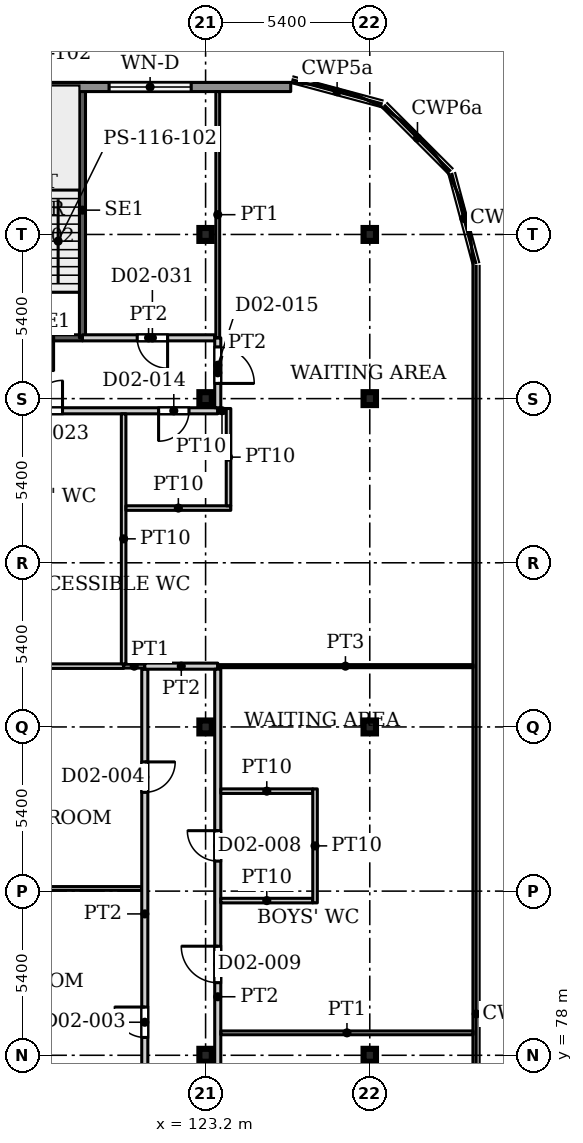
"""IFC4 building model, lengths in metres.
Left out: names, types, materials, properties, quantities, classifications, styles, units other than length and angle.
Written with IfcOpenShell. Run it as: python <this file> out.ifc"""

import sys

from ifc_helpers import new_model, si_unit, direction, frame, frame_2d, origin, origin_2d, place, context, subcontext, project, spatial, rectangle, i_section, extrude, source, transform, mapped, element, fill, save


model = new_model("IFC4")
c1 = context("Model", 3, precision=1e-05, world=origin(), true_north=direction((0.0, 1.0)))
c2 = subcontext(c1, "Body", "Model", "MODEL_VIEW")
j1 = project(units=[si_unit("LENGTHUNIT", "METRE"), si_unit("PLANEANGLEUNIT", "RADIAN")], contexts=[c1])
p1 = place(None, origin())
s1 = spatial("IfcSite", under=j1, at=p1, CompositionType="ELEMENT")
p2 = place(p1, origin())
s2 = spatial("IfcBuilding", under=s1, at=p2, CompositionType="ELEMENT")
p3 = place(p2, frame((0.0, 0.0, 12.5)))
s3 = spatial("IfcBuildingStorey", under=s2, at=p3, CompositionType="ELEMENT", Elevation=12.5)
for number, where, z_axis, x_axis in (
    (1, (123.2, 78.0, 0.0), (0.0, 0.0, 1.0), (1.0, 0.0, 0.0)),
    (2, (128.6, 78.0, 0.0), (0.0, 0.0, 1.0), (1.0, 0.0, 0.0)),
    (3, (123.2, 88.8, 0.0), (0.0, 0.0, 1.0), (1.0, 0.0, 0.0)),
    (4, (128.6, 88.8, 0.0), (0.0, 0.0, 1.0), (1.0, 0.0, 0.0)),
    (5, (123.2, 99.6, 0.0), (0.0, 0.0, 1.0), (1.0, 0.0, 0.0)),
    (6, (128.6, 99.6, 0.0), (0.0, 0.0, 1.0), (1.0, 0.0, 0.0)),
    (7, (123.2, 105.0, 0.0), (0.0, 0.0, 1.0), (1.0, 0.0, 0.0)),
    (8, (128.6, 105.0, 0.0), (0.0, 0.0, 1.0), (1.0, 0.0, 0.0)),
):
    element("IfcColumn", number, at=place(p3, frame(where, z_axis=z_axis, x_axis=x_axis)), inside=s3, PredefinedType="COLUMN", context=c2, shape_type="SweptSolid", body=[
        extrude(i_section(OverallWidth=0.409, OverallDepth=0.425, WebThickness=0.033, FlangeThickness=0.052, FilletRadius=0.013, at=origin_2d()), origin(), (0.0, 0.0, 1.0), 4.5),
    ])
p4 = place(p3, frame((78.48, 109.85, 0.0), z_axis=(0.0, 0.0, 1.0), x_axis=(1.0, 0.0, 0.0)))
e9 = element("IfcWall", 9, at=p4, inside=s3, PredefinedType="SOLIDWALL", context=c2, shape_type="SweptSolid", body=[
    extrude(rectangle(XDim=47.52, YDim=0.3, at=frame_2d((23.76, 0.0))), origin(), (0.0, 0.0, 1.0), 4.25),
])
p5 = place(p4, frame((1.045, 0.0, 0.9)))
e10 = element("IfcOpeningElement", 10, at=p5, cuts=e9, PredefinedType="OPENING", context=c2, shape_type="SweptSolid", body=[
    extrude(rectangle(XDim=2.7, YDim=2.1, at=frame_2d((1.35, 1.05))), frame((0.0, 0.16, 0.0), z_axis=(0.0, -1.0, 0.0), x_axis=(1.0, 0.0, 0.0)), (0.0, 0.0, 1.0), 0.32),
])
p6 = place(p4, frame((6.28, 0.0, 0.9)))
e11 = element("IfcOpeningElement", 11, at=p6, cuts=e9, PredefinedType="OPENING", context=c2, shape_type="SweptSolid", body=[
    extrude(rectangle(XDim=2.7, YDim=2.1, at=frame_2d((1.35, 1.05))), frame((0.0, 0.16, 0.0), z_axis=(0.0, -1.0, 0.0), x_axis=(1.0, 0.0, 0.0)), (0.0, 0.0, 1.0), 0.32),
])
p7 = place(p4, frame((15.765, 0.0, 0.9)))
e12 = element("IfcOpeningElement", 12, at=p7, cuts=e9, PredefinedType="OPENING", context=c2, shape_type="SweptSolid", body=[
    extrude(rectangle(XDim=2.7, YDim=2.1, at=frame_2d((1.35, 1.05))), frame((0.0, 0.16, 0.0), z_axis=(0.0, -1.0, 0.0), x_axis=(1.0, 0.0, 0.0)), (0.0, 0.0, 1.0), 0.32),
])
p8 = place(p4, frame((22.47, 0.0, 0.9)))
e13 = element("IfcOpeningElement", 13, at=p8, cuts=e9, PredefinedType="OPENING", context=c2, shape_type="SweptSolid", body=[
    extrude(rectangle(XDim=2.7, YDim=2.1, at=frame_2d((1.35, 1.05))), frame((0.0, 0.16, 0.0), z_axis=(0.0, -1.0, 0.0), x_axis=(1.0, 0.0, 0.0)), (0.0, 0.0, 1.0), 0.32),
])
p9 = place(p4, frame((30.99, 0.0, 0.9)))
e14 = element("IfcOpeningElement", 14, at=p9, cuts=e9, PredefinedType="OPENING", context=c2, shape_type="SweptSolid", body=[
    extrude(rectangle(XDim=2.7, YDim=2.1, at=frame_2d((1.35, 1.05))), frame((0.0, 0.16, 0.0), z_axis=(0.0, -1.0, 0.0), x_axis=(1.0, 0.0, 0.0)), (0.0, 0.0, 1.0), 0.32),
])
p10 = place(p4, frame((41.545, 0.0, 0.9)))
e15 = element("IfcOpeningElement", 15, at=p10, cuts=e9, PredefinedType="OPENING", context=c2, shape_type="SweptSolid", body=[
    extrude(rectangle(XDim=2.7, YDim=2.1, at=frame_2d((1.35, 1.05))), frame((0.0, 0.16, 0.0), z_axis=(0.0, -1.0, 0.0), x_axis=(1.0, 0.0, 0.0)), (0.0, 0.0, 1.0), 0.32),
])
p11 = place(p3, frame((116.0, 101.6, 0.0), z_axis=(0.0, 0.0, 1.0), x_axis=(1.0, 0.0, 0.0)))
e16 = element("IfcWall", 16, at=p11, inside=s3, PredefinedType="SHEAR", context=c2, shape_type="SweptSolid", body=[
    extrude(rectangle(XDim=3.15, YDim=0.2, at=frame_2d((1.575, 0.0))), origin(), (0.0, 0.0, 1.0), 4.5),
])
p12 = place(p11, frame((1.1, 0.0, 0.0)))
e17 = element("IfcOpeningElement", 17, at=p12, cuts=e16, PredefinedType="OPENING", context=c2, shape_type="SweptSolid", body=[
    extrude(rectangle(XDim=1.1, YDim=2.2, at=frame_2d((0.55, 1.1))), frame((0.0, 0.11, 0.0), z_axis=(0.0, -1.0, 0.0), x_axis=(1.0, 0.0, 0.0)), (0.0, 0.0, 1.0), 0.22),
])
p13 = place(p3, frame((119.15, 101.6, 0.0), z_axis=(0.0, 0.0, 1.0), x_axis=(0.0, 1.0, 0.0)))
e18 = element("IfcWall", 18, at=p13, inside=s3, PredefinedType="SHEAR", context=c2, shape_type="SweptSolid", body=[
    extrude(rectangle(XDim=8.4, YDim=0.2, at=frame_2d((4.2, 0.0))), origin(), (0.0, 0.0, 1.0), 4.5),
])
p14 = place(p3, frame((56.1, 99.2, 0.0), z_axis=(0.0, 0.0, 1.0), x_axis=(1.0, 0.0, 0.0)))
e19 = element("IfcWall", 19, at=p14, inside=s3, PredefinedType="PARTITIONING", context=c2, shape_type="SweptSolid", body=[
    extrude(rectangle(XDim=67.5, YDim=0.2, at=frame_2d((33.75, 0.0))), origin(), (0.0, 0.0, 1.0), 4.18),
])
p15 = place(p14, frame((4.05, 0.0, 0.0)))
e20 = element("IfcOpeningElement", 20, at=p15, cuts=e19, PredefinedType="OPENING", context=c2, shape_type="SweptSolid", body=[
    extrude(rectangle(XDim=1.0, YDim=2.1, at=frame_2d((0.5, 1.05))), frame((0.0, 0.11, 0.0), z_axis=(0.0, -1.0, 0.0), x_axis=(1.0, 0.0, 0.0)), (0.0, 0.0, 1.0), 0.22),
])
p16 = place(p14, frame((65.554, 0.0, 0.0)))
e21 = element("IfcOpeningElement", 21, at=p16, cuts=e19, PredefinedType="OPENING", context=c2, shape_type="SweptSolid", body=[
    extrude(rectangle(XDim=1.0, YDim=2.1, at=frame_2d((0.5, 1.05))), frame((0.0, 0.11, 0.0), z_axis=(0.0, -1.0, 0.0), x_axis=(1.0, 0.0, 0.0)), (0.0, 0.0, 1.0), 0.22),
])
p17 = place(p14, frame((11.589, 0.0, 0.0)))
e22 = element("IfcOpeningElement", 22, at=p17, cuts=e19, PredefinedType="OPENING", context=c2, shape_type="SweptSolid", body=[
    extrude(rectangle(XDim=1.0, YDim=2.1, at=frame_2d((0.5, 1.05))), frame((0.0, 0.11, 0.0), z_axis=(0.0, -1.0, 0.0), x_axis=(1.0, 0.0, 0.0)), (0.0, 0.0, 1.0), 0.22),
])
p18 = place(p14, frame((20.329, 0.0, 0.0)))
e23 = element("IfcOpeningElement", 23, at=p18, cuts=e19, PredefinedType="OPENING", context=c2, shape_type="SweptSolid", body=[
    extrude(rectangle(XDim=1.0, YDim=2.1, at=frame_2d((0.5, 1.05))), frame((0.0, 0.11, 0.0), z_axis=(0.0, -1.0, 0.0), x_axis=(1.0, 0.0, 0.0)), (0.0, 0.0, 1.0), 0.22),
])
p19 = place(p14, frame((27.319, 0.0, 0.0)))
e24 = element("IfcOpeningElement", 24, at=p19, cuts=e19, PredefinedType="OPENING", context=c2, shape_type="SweptSolid", body=[
    extrude(rectangle(XDim=1.0, YDim=2.1, at=frame_2d((0.5, 1.05))), frame((0.0, 0.11, 0.0), z_axis=(0.0, -1.0, 0.0), x_axis=(1.0, 0.0, 0.0)), (0.0, 0.0, 1.0), 0.22),
])
p20 = place(p14, frame((33.262, 0.0, 0.0)))
e25 = element("IfcOpeningElement", 25, at=p20, cuts=e19, PredefinedType="OPENING", context=c2, shape_type="SweptSolid", body=[
    extrude(rectangle(XDim=1.0, YDim=2.1, at=frame_2d((0.5, 1.05))), frame((0.0, 0.11, 0.0), z_axis=(0.0, -1.0, 0.0), x_axis=(1.0, 0.0, 0.0)), (0.0, 0.0, 1.0), 0.22),
])
p21 = place(p14, frame((42.002, 0.0, 0.0)))
e26 = element("IfcOpeningElement", 26, at=p21, cuts=e19, PredefinedType="OPENING", context=c2, shape_type="SweptSolid", body=[
    extrude(rectangle(XDim=1.0, YDim=2.1, at=frame_2d((0.5, 1.05))), frame((0.0, 0.11, 0.0), z_axis=(0.0, -1.0, 0.0), x_axis=(1.0, 0.0, 0.0)), (0.0, 0.0, 1.0), 0.22),
])
p22 = place(p14, frame((49.743, 0.0, 0.0)))
e27 = element("IfcOpeningElement", 27, at=p22, cuts=e19, PredefinedType="OPENING", context=c2, shape_type="SweptSolid", body=[
    extrude(rectangle(XDim=1.0, YDim=2.1, at=frame_2d((0.5, 1.05))), frame((0.0, 0.11, 0.0), z_axis=(0.0, -1.0, 0.0), x_axis=(1.0, 0.0, 0.0)), (0.0, 0.0, 1.0), 0.22),
])
p23 = place(p14, frame((56.733, 0.0, 0.0)))
e28 = element("IfcOpeningElement", 28, at=p23, cuts=e19, PredefinedType="OPENING", context=c2, shape_type="SweptSolid", body=[
    extrude(rectangle(XDim=1.0, YDim=2.1, at=frame_2d((0.5, 1.05))), frame((0.0, 0.11, 0.0), z_axis=(0.0, -1.0, 0.0), x_axis=(1.0, 0.0, 0.0)), (0.0, 0.0, 1.0), 0.22),
])
p24 = place(p14, frame((61.394, 0.0, 0.0)))
e29 = element("IfcOpeningElement", 29, at=p24, cuts=e19, PredefinedType="OPENING", context=c2, shape_type="SweptSolid", body=[
    extrude(rectangle(XDim=1.0, YDim=2.1, at=frame_2d((0.5, 1.05))), frame((0.0, 0.11, 0.0), z_axis=(0.0, -1.0, 0.0), x_axis=(1.0, 0.0, 0.0)), (0.0, 0.0, 1.0), 0.22),
])
p25 = place(p3, frame((110.183, 90.8, 0.0), z_axis=(0.0, 0.0, 1.0), x_axis=(1.0, 0.0, 0.0)))
e30 = element("IfcWall", 30, at=p25, inside=s3, PredefinedType="PARTITIONING", context=c2, shape_type="SweptSolid", body=[
    extrude(rectangle(XDim=10.321, YDim=0.15, at=frame_2d((5.16, 0.0))), origin(), (0.0, 0.0, 1.0), 4.18),
])
p26 = place(p3, frame((112.862, 83.487, 0.0), z_axis=(0.0, 0.0, 1.0), x_axis=(1.0, 0.0, 0.0)))
e31 = element("IfcWall", 31, at=p26, inside=s3, PredefinedType="PARTITIONING", context=c2, shape_type="SweptSolid", body=[
    extrude(rectangle(XDim=8.238, YDim=0.125, at=frame_2d((4.119, 0.0))), origin(), (0.0, 0.0, 1.0), 4.18),
])
p27 = place(p3, frame((119.15, 101.6, 0.0), z_axis=(0.0, 0.0, 1.0), x_axis=(1.0, 0.0, 0.0)))
e32 = element("IfcWall", 32, at=p27, inside=s3, PredefinedType="PARTITIONING", context=c2, shape_type="SweptSolid", body=[
    extrude(rectangle(XDim=4.35, YDim=0.2, at=frame_2d((2.175, 0.0))), origin(), (0.0, 0.0, 1.0), 4.18),
])
p28 = place(p27, frame((1.8, 0.0, 0.0)))
e33 = element("IfcOpeningElement", 33, at=p28, cuts=e32, PredefinedType="OPENING", context=c2, shape_type="SweptSolid", body=[
    extrude(rectangle(XDim=1.0, YDim=2.1, at=frame_2d((0.5, 1.05))), frame((0.0, 0.11, 0.0), z_axis=(0.0, -1.0, 0.0), x_axis=(1.0, 0.0, 0.0)), (0.0, 0.0, 1.0), 0.22),
])
p29 = place(p3, frame((120.504, 90.8, 0.0), z_axis=(0.0, 0.0, 1.0), x_axis=(1.0, 0.0, 0.0)))
e34 = element("IfcWall", 34, at=p29, inside=s3, PredefinedType="PARTITIONING", context=c2, shape_type="SweptSolid", body=[
    extrude(rectangle(XDim=0.696, YDim=0.125, at=frame_2d((0.348, 0.0))), origin(), (0.0, 0.0, 1.0), 4.18),
])
p30 = place(p3, frame((120.504, 90.875, 0.0), z_axis=(0.0, 0.0, 1.0), x_axis=(0.0, 1.0, 0.0)))
e35 = element("IfcWall", 35, at=p30, inside=s3, PredefinedType="PARTITIONING", context=c2, shape_type="SweptSolid", body=[
    extrude(rectangle(XDim=8.225, YDim=0.15, at=frame_2d((4.113, 0.0))), origin(), (0.0, 0.0, 1.0), 4.18),
])
p31 = place(p3, frame((120.579, 96.0, 0.0), z_axis=(0.0, 0.0, 1.0), x_axis=(1.0, 0.0, 0.0)))
e36 = element("IfcWall", 36, at=p31, inside=s3, PredefinedType="PARTITIONING", context=c2, shape_type="SweptSolid", body=[
    extrude(rectangle(XDim=3.45, YDim=0.15, at=frame_2d((1.725, 0.0))), origin(), (0.0, 0.0, 1.0), 4.18),
])
p32 = place(p3, frame((121.2, 74.6, 0.0), z_axis=(0.0, 0.0, 1.0), x_axis=(0.0, 1.0, 0.0)))
e37 = element("IfcWall", 37, at=p32, inside=s3, PredefinedType="PARTITIONING", context=c2, shape_type="SweptSolid", body=[
    extrude(rectangle(XDim=16.1, YDim=0.2, at=frame_2d((8.05, 0.0))), origin(), (0.0, 0.0, 1.0), 4.18),
])
p33 = place(p32, frame((3.987, 0.0, 0.0)))
e38 = element("IfcOpeningElement", 38, at=p33, cuts=e37, PredefinedType="OPENING", context=c2, shape_type="SweptSolid", body=[
    extrude(rectangle(XDim=1.0, YDim=2.1, at=frame_2d((0.5, 1.05))), frame((0.0, 0.11, 0.0), z_axis=(0.0, -1.0, 0.0), x_axis=(1.0, 0.0, 0.0)), (0.0, 0.0, 1.0), 0.22),
])
p34 = place(p32, frame((12.05, 0.0, 0.0)))
e39 = element("IfcOpeningElement", 39, at=p34, cuts=e37, PredefinedType="OPENING", context=c2, shape_type="SweptSolid", body=[
    extrude(rectangle(XDim=1.0, YDim=2.1, at=frame_2d((0.5, 1.05))), frame((0.0, 0.11, 0.0), z_axis=(0.0, -1.0, 0.0), x_axis=(1.0, 0.0, 0.0)), (0.0, 0.0, 1.0), 0.22),
])
p35 = place(p3, frame((121.2, 90.8, 0.0), z_axis=(0.0, 0.0, 1.0), x_axis=(1.0, 0.0, 0.0)))
e40 = element("IfcWall", 40, at=p35, inside=s3, PredefinedType="PARTITIONING", context=c2, shape_type="SweptSolid", body=[
    extrude(rectangle(XDim=2.4, YDim=0.2, at=frame_2d((1.2, 0.0))), origin(), (0.0, 0.0, 1.0), 4.18),
])
p36 = place(p3, frame((123.6, 69.15, 0.0), z_axis=(0.0, 0.0, 1.0), x_axis=(0.0, 1.0, 0.0)))
e41 = element("IfcWall", 41, at=p36, inside=s3, PredefinedType="PARTITIONING", context=c2, shape_type="SweptSolid", body=[
    extrude(rectangle(XDim=21.55, YDim=0.2, at=frame_2d((10.775, 0.0))), origin(), (0.0, 0.0, 1.0), 4.18),
])
p37 = place(p36, frame((4.4, 0.0, 0.0)))
e42 = element("IfcOpeningElement", 42, at=p37, cuts=e41, PredefinedType="OPENING", context=c2, shape_type="SweptSolid", body=[
    extrude(rectangle(XDim=1.0, YDim=2.1, at=frame_2d((0.5, 1.05))), frame((0.0, 0.11, 0.0), z_axis=(0.0, -1.0, 0.0), x_axis=(1.0, 0.0, 0.0)), (0.0, 0.0, 1.0), 0.22),
])
p38 = place(p36, frame((15.238, 0.0, 0.0)))
e43 = element("IfcOpeningElement", 43, at=p38, cuts=e41, PredefinedType="OPENING", context=c2, shape_type="SweptSolid", body=[
    extrude(rectangle(XDim=1.0, YDim=2.1, at=frame_2d((0.5, 1.05))), frame((0.0, 0.11, 0.0), z_axis=(0.0, -1.0, 0.0), x_axis=(1.0, 0.0, 0.0)), (0.0, 0.0, 1.0), 0.22),
])
p39 = place(p36, frame((11.238, 0.0, 0.0)))
e44 = element("IfcOpeningElement", 44, at=p39, cuts=e41, PredefinedType="OPENING", context=c2, shape_type="SweptSolid", body=[
    extrude(rectangle(XDim=1.2, YDim=2.1, at=frame_2d((0.6, 1.05))), frame((0.0, 0.11, 0.0), z_axis=(0.0, -1.0, 0.0), x_axis=(1.0, 0.0, 0.0)), (0.0, 0.0, 1.0), 0.22),
])
p40 = place(p3, frame((123.6, 90.8, 0.0), z_axis=(0.0, 0.0, 1.0), x_axis=(1.0, 0.0, 0.0)))
e45 = element("IfcWall", 45, at=p40, inside=s3, PredefinedType="PARTITIONING", context=c2, shape_type="SweptSolid", body=[
    extrude(rectangle(XDim=8.4, YDim=0.1, at=frame_2d((4.2, 0.0))), origin(), (0.0, 0.0, 1.0), 4.18),
])
p41 = place(p3, frame((123.6, 99.2, 0.0), z_axis=(0.0, 0.0, 1.0), x_axis=(1.0, 0.0, 0.0)))
e46 = element("IfcWall", 46, at=p41, inside=s3, PredefinedType="PARTITIONING", context=c2, shape_type="SweptSolid", body=[
    extrude(rectangle(XDim=0.279, YDim=0.15, at=frame_2d((0.139, 0.0))), origin(), (0.0, 0.0, 1.0), 4.18),
])
p42 = place(p3, frame((123.6, 99.3, 0.0), z_axis=(0.0, 0.0, 1.0), x_axis=(0.0, 1.0, 0.0)))
e47 = element("IfcWall", 47, at=p42, inside=s3, PredefinedType="PARTITIONING", context=c2, shape_type="SweptSolid", body=[
    extrude(rectangle(XDim=2.3, YDim=0.2, at=frame_2d((1.15, 0.0))), origin(), (0.0, 0.0, 1.0), 4.18),
])
p43 = place(p42, frame((0.8, 0.0, 0.0)))
e48 = element("IfcOpeningElement", 48, at=p43, cuts=e47, PredefinedType="OPENING", context=c2, shape_type="SweptSolid", body=[
    extrude(rectangle(XDim=1.2, YDim=2.1, at=frame_2d((0.6, 1.05))), frame((0.0, 0.11, 0.0), z_axis=(0.0, -1.0, 0.0), x_axis=(1.0, 0.0, 0.0)), (0.0, 0.0, 1.0), 0.22),
])
p44 = place(p3, frame((123.6, 101.6, 0.0), z_axis=(0.0, 0.0, 1.0), x_axis=(0.0, 1.0, 0.0)))
e49 = element("IfcWall", 49, at=p44, inside=s3, PredefinedType="PARTITIONING", context=c2, shape_type="SweptSolid", body=[
    extrude(rectangle(XDim=8.101, YDim=0.125, at=frame_2d((4.05, 0.0))), origin(), (0.0, 0.0, 1.0), 4.18),
])
p45 = place(p3, frame((123.7, 78.738, 0.0), z_axis=(0.0, 0.0, 1.0), x_axis=(1.0, 0.0, 0.0)))
e50 = element("IfcWall", 50, at=p45, inside=s3, PredefinedType="PARTITIONING", context=c2, shape_type="SweptSolid", body=[
    extrude(rectangle(XDim=8.3, YDim=0.125, at=frame_2d((4.15, 0.0))), origin(), (0.0, 0.0, 1.0), 4.18),
])
for number, where, z_axis, x_axis in (
    (51, (123.7, 83.088, 0.0), (0.0, 0.0, 1.0), (1.0, 0.0, 0.0)),
    (52, (123.7, 86.688, 0.0), (0.0, 0.0, 1.0), (1.0, 0.0, 0.0)),
):
    element("IfcWall", number, at=place(p3, frame(where, z_axis=z_axis, x_axis=x_axis)), inside=s3, PredefinedType="PARTITIONING", context=c2, shape_type="SweptSolid", body=[
        extrude(rectangle(XDim=3.025, YDim=0.15, at=frame_2d((1.513, 0.0))), origin(), (0.0, 0.0, 1.0), 4.18),
    ])
p46 = place(p3, frame((123.954, 96.075, 0.0), z_axis=(0.0, 0.0, 1.0), x_axis=(0.0, 1.0, 0.0)))
e53 = element("IfcWall", 53, at=p46, inside=s3, PredefinedType="PARTITIONING", context=c2, shape_type="SweptSolid", body=[
    extrude(rectangle(XDim=3.2, YDim=0.15, at=frame_2d((1.6, 0.0))), origin(), (0.0, 0.0, 1.0), 4.18),
])
p47 = place(p3, frame((126.8, 83.013, 0.0), z_axis=(0.0, 0.0, 1.0), x_axis=(0.0, 1.0, 0.0)))
e54 = element("IfcWall", 54, at=p47, inside=s3, PredefinedType="PARTITIONING", context=c2, shape_type="SweptSolid", body=[
    extrude(rectangle(XDim=3.75, YDim=0.15, at=frame_2d((1.875, 0.0))), origin(), (0.0, 0.0, 1.0), 4.18),
])
m1 = source(origin(), c2, "Body", "SweptSolid", [
    extrude(rectangle(XDim=2.7, YDim=2.1, at=frame_2d((1.35, 1.05))), frame((0.0, 0.03, 0.0), z_axis=(0.0, -1.0, 0.0), x_axis=(1.0, 0.0, 0.0)), (0.0, 0.0, 1.0), 0.06),
])
p48 = place(p10, origin())
e55 = element("IfcWindow", 55, at=p48, inside=s3, PartitioningType="SINGLE_PANEL", PredefinedType="WINDOW", context=c2, shape_type="MappedRepresentation", body=[
    mapped(m1, transform((0.0, 0.0, 0.0), x_axis=(1.0, 0.0, 0.0), y_axis=(0.0, 1.0, 0.0), z_axis=(0.0, 0.0, 1.0), scale=1.0)),
])
fill(e15, e55)
m2 = source(origin(), c2, "Body", "SweptSolid", [
    extrude(rectangle(XDim=1.1, YDim=2.2, at=frame_2d((0.55, 1.1))), frame((0.0, 0.025, 0.0), z_axis=(0.0, -1.0, 0.0), x_axis=(1.0, 0.0, 0.0)), (0.0, 0.0, 1.0), 0.05),
])
p49 = place(p12, origin())
e56 = element("IfcDoor", 56, at=p49, inside=s3, OperationType="SINGLE_SWING_RIGHT", PredefinedType="DOOR", context=c2, shape_type="MappedRepresentation", body=[
    mapped(m2, transform((0.0, 0.0, 0.0), x_axis=(1.0, 0.0, 0.0), y_axis=(0.0, 1.0, 0.0), z_axis=(0.0, 0.0, 1.0), scale=1.0)),
])
fill(e17, e56)
m3 = source(origin(), c2, "Body", "SweptSolid", [
    extrude(rectangle(XDim=1.0, YDim=2.1, at=frame_2d((0.5, 1.05))), frame((0.0, 0.025, 0.0), z_axis=(0.0, -1.0, 0.0), x_axis=(1.0, 0.0, 0.0)), (0.0, 0.0, 1.0), 0.05),
])
p50 = place(p33, origin())
e57 = element("IfcDoor", 57, at=p50, inside=s3, OperationType="SINGLE_SWING_LEFT", PredefinedType="DOOR", context=c2, shape_type="MappedRepresentation", body=[
    mapped(m3, transform((0.0, 0.0, 0.0), x_axis=(1.0, 0.0, 0.0), y_axis=(0.0, 1.0, 0.0), z_axis=(0.0, 0.0, 1.0), scale=1.0)),
])
fill(e38, e57)
p51 = place(p34, origin())
e58 = element("IfcDoor", 58, at=p51, inside=s3, OperationType="SINGLE_SWING_RIGHT", PredefinedType="DOOR", context=c2, shape_type="MappedRepresentation", body=[
    mapped(m3, transform((0.0, 0.0, 0.0), x_axis=(1.0, 0.0, 0.0), y_axis=(0.0, 1.0, 0.0), z_axis=(0.0, 0.0, 1.0), scale=1.0)),
])
fill(e39, e58)
p52 = place(p38, origin())
e59 = element("IfcDoor", 59, at=p52, inside=s3, OperationType="SINGLE_SWING_LEFT", PredefinedType="DOOR", context=c2, shape_type="MappedRepresentation", body=[
    mapped(m3, transform((0.0, 0.0, 0.0), x_axis=(1.0, 0.0, 0.0), y_axis=(0.0, 1.0, 0.0), z_axis=(0.0, 0.0, 1.0), scale=1.0)),
])
fill(e43, e59)
m4 = source(origin(), c2, "Body", "SweptSolid", [
    extrude(rectangle(XDim=1.2, YDim=2.1, at=frame_2d((0.6, 1.05))), frame((0.0, 0.025, 0.0), z_axis=(0.0, -1.0, 0.0), x_axis=(1.0, 0.0, 0.0)), (0.0, 0.0, 1.0), 0.05),
])
p53 = place(p39, origin())
e60 = element("IfcDoor", 60, at=p53, inside=s3, OperationType="SINGLE_SWING_LEFT", PredefinedType="DOOR", context=c2, shape_type="MappedRepresentation", body=[
    mapped(m4, transform((0.0, 0.0, 0.0), x_axis=(1.0, 0.0, 0.0), y_axis=(0.0, 1.0, 0.0), z_axis=(0.0, 0.0, 1.0), scale=1.0)),
])
fill(e44, e60)
p54 = place(p16, origin())
e61 = element("IfcDoor", 61, at=p54, inside=s3, OperationType="SINGLE_SWING_RIGHT", PredefinedType="DOOR", context=c2, shape_type="MappedRepresentation", body=[
    mapped(m3, transform((0.0, 0.0, 0.0), x_axis=(1.0, 0.0, 0.0), y_axis=(0.0, 1.0, 0.0), z_axis=(0.0, 0.0, 1.0), scale=1.0)),
])
fill(e21, e61)
p55 = place(p43, origin())
e62 = element("IfcDoor", 62, at=p55, inside=s3, OperationType="SINGLE_SWING_RIGHT", PredefinedType="DOOR", context=c2, shape_type="MappedRepresentation", body=[
    mapped(m4, transform((0.0, 0.0, 0.0), x_axis=(1.0, 0.0, 0.0), y_axis=(0.0, 1.0, 0.0), z_axis=(0.0, 0.0, 1.0), scale=1.0)),
])
fill(e48, e62)
p56 = place(p24, origin())
e63 = element("IfcDoor", 63, at=p56, inside=s3, OperationType="SINGLE_SWING_LEFT", PredefinedType="DOOR", context=c2, shape_type="MappedRepresentation", body=[
    mapped(m3, transform((0.0, 0.0, 0.0), x_axis=(1.0, 0.0, 0.0), y_axis=(0.0, 1.0, 0.0), z_axis=(0.0, 0.0, 1.0), scale=1.0)),
])
fill(e29, e63)
p57 = place(p28, origin())
e64 = element("IfcDoor", 64, at=p57, inside=s3, OperationType="SINGLE_SWING_RIGHT", PredefinedType="DOOR", context=c2, shape_type="MappedRepresentation", body=[
    mapped(m3, transform((0.0, 0.0, 0.0), x_axis=(1.0, 0.0, 0.0), y_axis=(0.0, 1.0, 0.0), z_axis=(0.0, 0.0, 1.0), scale=1.0)),
])
fill(e33, e64)
save(model, sys.argv[1])
